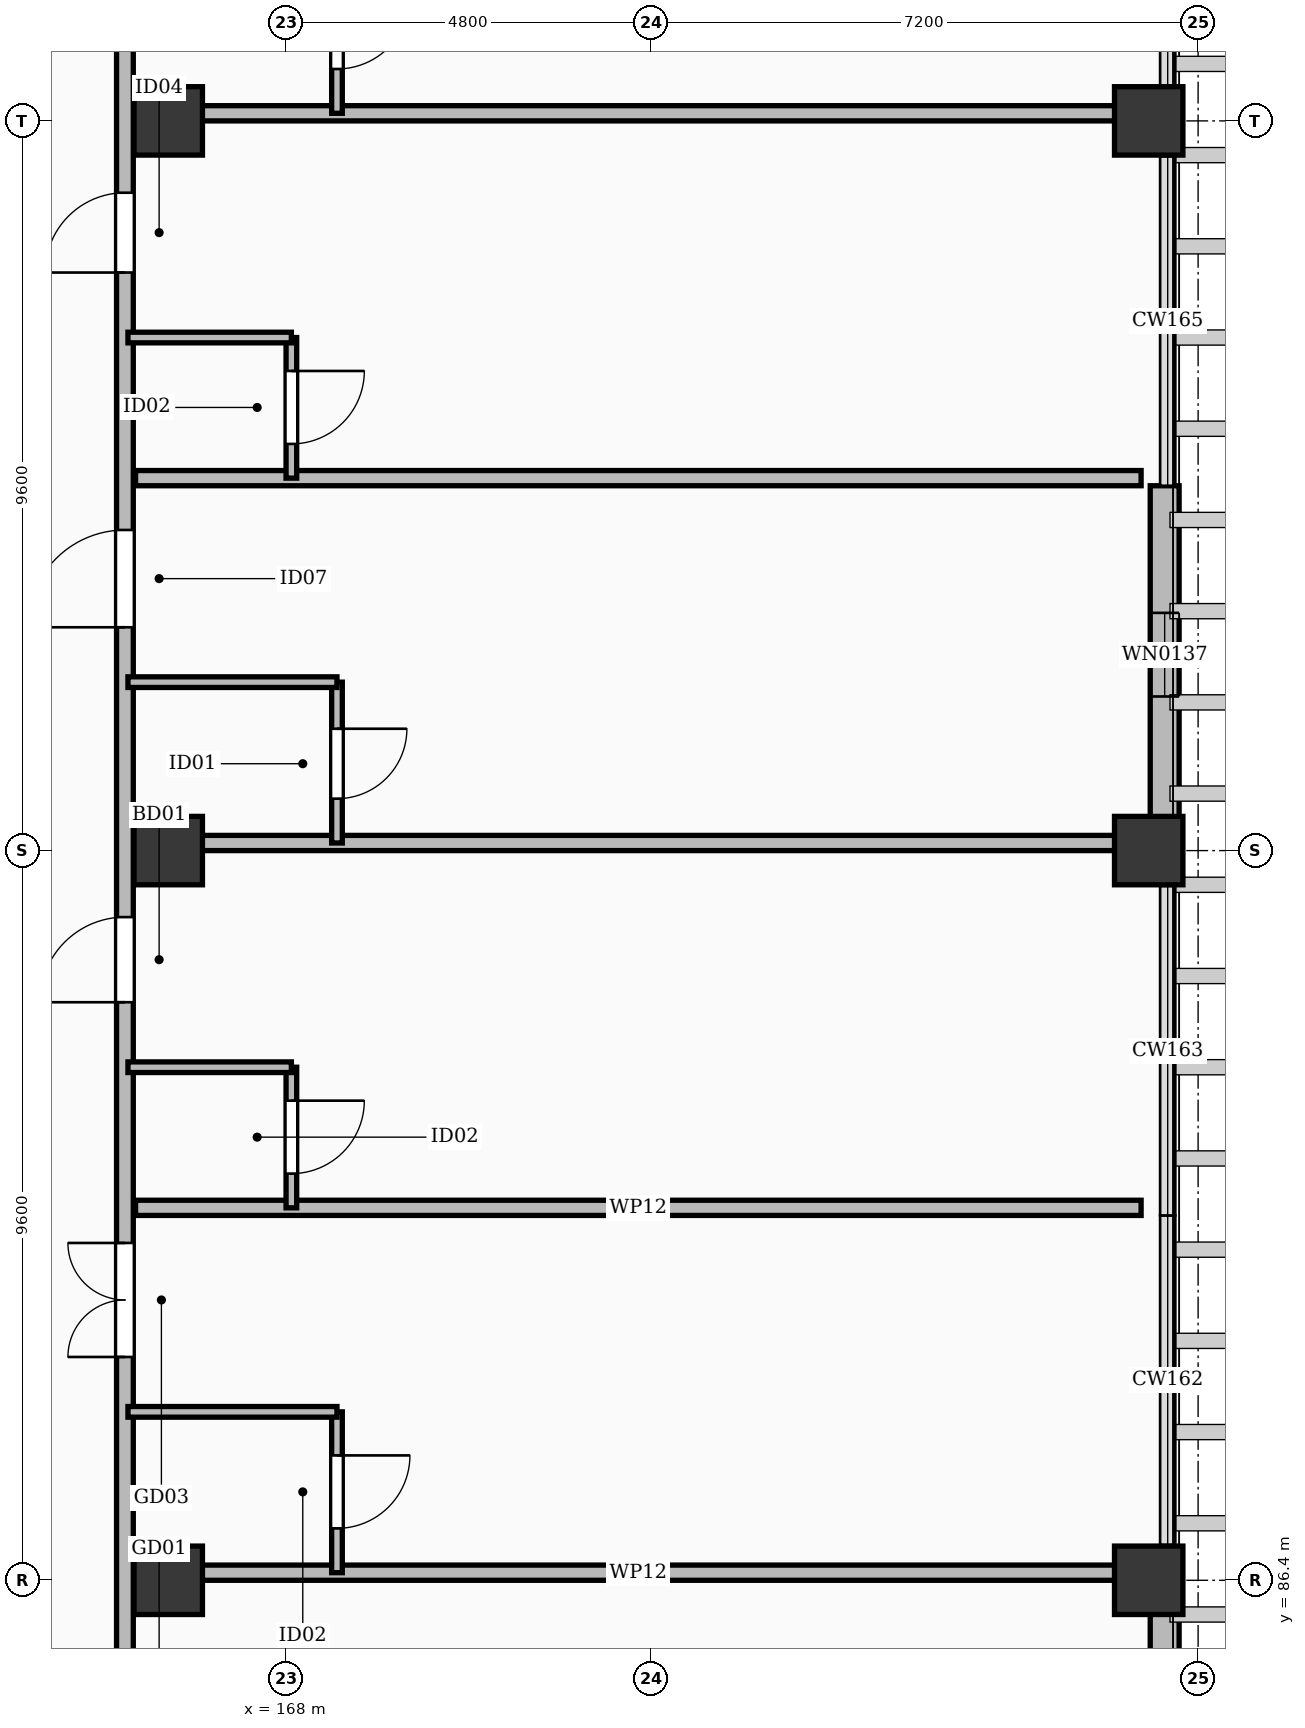
"""IFC4 building model, lengths in metres.
Left out: names, types, materials, properties, quantities, classifications, styles, units other than length and angle.
Written with IfcOpenShell. Run it as: python <this file> out.ifc"""

import sys

from ifc_helpers import new_model, si_unit, direction, frame, frame_2d, origin, origin_2d, place, context, subcontext, project, spatial, rectangle, extrude, element, fill, save


model = new_model("IFC4")
c1 = context("Model", 3, precision=1e-05, world=origin(), true_north=direction((0.0, 1.0)))
c2 = subcontext(c1, "Body", "Model", "MODEL_VIEW")
j1 = project(units=[si_unit("LENGTHUNIT", "METRE"), si_unit("PLANEANGLEUNIT", "RADIAN")], contexts=[c1])
p1 = place(None, origin())
s1 = spatial("IfcSite", under=j1, at=p1, CompositionType="ELEMENT")
p2 = place(p1, origin())
s2 = spatial("IfcBuilding", under=s1, at=p2, CompositionType="ELEMENT")
p3 = place(p2, frame((0.0, 0.0, 16.2)))
s3 = spatial("IfcBuildingStorey", under=s2, at=p3, CompositionType="ELEMENT", Elevation=16.2)
for number, where, z_axis, x_axis in (
    (1, (166.45, 86.4, 0.0), (0.0, 0.0, 1.0), (1.0, 0.0, 0.0)),
    (2, (166.45, 96.0, 0.0), (0.0, 0.0, 1.0), (1.0, 0.0, 0.0)),
    (3, (166.45, 105.6, 0.0), (0.0, 0.0, 1.0), (1.0, 0.0, 0.0)),
    (4, (179.35, 86.4, 0.0), (0.0, 0.0, 1.0), (1.0, 0.0, 0.0)),
    (5, (179.35, 96.0, 0.0), (0.0, 0.0, 1.0), (1.0, 0.0, 0.0)),
    (6, (179.35, 105.6, 0.0), (0.0, 0.0, 1.0), (1.0, 0.0, 0.0)),
):
    element("IfcColumn", number, at=place(p3, frame(where, z_axis=z_axis, x_axis=x_axis)), inside=s3, PredefinedType="COLUMN", context=c2, shape_type="SweptSolid", body=[
        extrude(rectangle(XDim=0.9, YDim=0.9, at=origin_2d()), origin(), (0.0, 0.0, 1.0), 4.8),
    ])
p4 = place(p3, frame((179.56, 85.975, 0.0), z_axis=(0.0, 0.0, 1.0), x_axis=(0.0, -1.0, 0.0)))
e7 = element("IfcWall", 7, at=p4, inside=s3, PredefinedType="SOLIDWALL", context=c2, shape_type="SweptSolid", body=[
    extrude(rectangle(XDim=4.375, YDim=0.38, at=frame_2d((2.188, 0.0))), origin(), (0.0, 0.0, 1.0), 3.032),
])
p5 = place(p4, frame((1.403, 0.0, 0.55)))
e8 = element("IfcOpeningElement", 8, at=p5, cuts=e7, PredefinedType="OPENING", context=c2, shape_type="SweptSolid", body=[
    extrude(rectangle(XDim=1.5, YDim=1.74, at=frame_2d((0.75, 0.87))), frame((0.0, 0.202, 0.0), z_axis=(0.0, -1.0, 0.0), x_axis=(1.0, 0.0, 0.0)), (0.0, 0.0, 1.0), 0.404),
])
p6 = place(p3, frame((179.56, 100.8, 0.0), z_axis=(0.0, 0.0, 1.0), x_axis=(0.0, -1.0, 0.0)))
e9 = element("IfcWall", 9, at=p6, inside=s3, PredefinedType="SOLIDWALL", context=c2, shape_type="SweptSolid", body=[
    extrude(rectangle(XDim=4.375, YDim=0.38, at=frame_2d((2.188, 0.0))), origin(), (0.0, 0.0, 1.0), 3.032),
])
p7 = place(p6, frame((1.673, 0.0, 0.55)))
e10 = element("IfcOpeningElement", 10, at=p7, cuts=e9, PredefinedType="OPENING", context=c2, shape_type="SweptSolid", body=[
    extrude(rectangle(XDim=1.1, YDim=1.7, at=frame_2d((0.55, 0.85))), frame((0.0, 0.202, 0.0), z_axis=(0.0, -1.0, 0.0), x_axis=(1.0, 0.0, 0.0)), (0.0, 0.0, 1.0), 0.404),
])
p8 = place(p3, frame((165.88, 65.4, 0.0), z_axis=(0.0, 0.0, 1.0), x_axis=(0.0, 1.0, 0.0)))
e11 = element("IfcWall", 11, at=p8, inside=s3, PredefinedType="PARTITIONING", context=c2, shape_type="SweptSolid", body=[
    extrude(rectangle(XDim=60.25, YDim=0.22, at=frame_2d((30.125, 0.0))), origin(), (0.0, 0.0, 1.0), 3.732),
])
p9 = place(p8, frame((4.738, 0.0, 0.0)))
e12 = element("IfcOpeningElement", 12, at=p9, cuts=e11, PredefinedType="OPENING", context=c2, shape_type="SweptSolid", body=[
    extrude(rectangle(XDim=1.28, YDim=2.16, at=frame_2d((0.64, 1.08))), frame((0.0, 0.122, 0.0), z_axis=(0.0, -1.0, 0.0), x_axis=(1.0, 0.0, 0.0)), (0.0, 0.0, 1.0), 0.244),
])
p10 = place(p8, frame((9.405, 0.0, 0.0)))
e13 = element("IfcOpeningElement", 13, at=p10, cuts=e11, PredefinedType="OPENING", context=c2, shape_type="SweptSolid", body=[
    extrude(rectangle(XDim=1.05, YDim=2.18, at=frame_2d((0.525, 1.09))), frame((0.0, 0.122, 0.0), z_axis=(0.0, -1.0, 0.0), x_axis=(1.0, 0.0, 0.0)), (0.0, 0.0, 1.0), 0.244),
])
p11 = place(p8, frame((14.338, 0.0, 0.0)))
e14 = element("IfcOpeningElement", 14, at=p11, cuts=e11, PredefinedType="OPENING", context=c2, shape_type="SweptSolid", body=[
    extrude(rectangle(XDim=1.08, YDim=2.25, at=frame_2d((0.54, 1.125))), frame((0.0, 0.122, 0.0), z_axis=(0.0, -1.0, 0.0), x_axis=(1.0, 0.0, 0.0)), (0.0, 0.0, 1.0), 0.244),
])
p12 = place(p8, frame((19.005, 0.0, 0.0)))
e15 = element("IfcOpeningElement", 15, at=p12, cuts=e11, PredefinedType="OPENING", context=c2, shape_type="SweptSolid", body=[
    extrude(rectangle(XDim=1.02, YDim=2.2, at=frame_2d((0.51, 1.1))), frame((0.0, 0.122, 0.0), z_axis=(0.0, -1.0, 0.0), x_axis=(1.0, 0.0, 0.0)), (0.0, 0.0, 1.0), 0.244),
])
p13 = place(p8, frame((23.938, 0.0, 0.0)))
e16 = element("IfcOpeningElement", 16, at=p13, cuts=e11, PredefinedType="OPENING", context=c2, shape_type="SweptSolid", body=[
    extrude(rectangle(XDim=1.5, YDim=2.3, at=frame_2d((0.75, 1.15))), frame((0.0, 0.122, 0.0), z_axis=(0.0, -1.0, 0.0), x_axis=(1.0, 0.0, 0.0)), (0.0, 0.0, 1.0), 0.244),
])
p14 = place(p8, frame((28.605, 0.0, 0.0)))
e17 = element("IfcOpeningElement", 17, at=p14, cuts=e11, PredefinedType="OPENING", context=c2, shape_type="SweptSolid", body=[
    extrude(rectangle(XDim=1.12, YDim=2.15, at=frame_2d((0.56, 1.075))), frame((0.0, 0.122, 0.0), z_axis=(0.0, -1.0, 0.0), x_axis=(1.0, 0.0, 0.0)), (0.0, 0.0, 1.0), 0.244),
])
p15 = place(p8, frame((33.538, 0.0, 0.0)))
e18 = element("IfcOpeningElement", 18, at=p15, cuts=e11, PredefinedType="OPENING", context=c2, shape_type="SweptSolid", body=[
    extrude(rectangle(XDim=1.28, YDim=2.16, at=frame_2d((0.64, 1.08))), frame((0.0, 0.122, 0.0), z_axis=(0.0, -1.0, 0.0), x_axis=(1.0, 0.0, 0.0)), (0.0, 0.0, 1.0), 0.244),
])
p16 = place(p8, frame((38.205, 0.0, 0.0)))
e19 = element("IfcOpeningElement", 19, at=p16, cuts=e11, PredefinedType="OPENING", context=c2, shape_type="SweptSolid", body=[
    extrude(rectangle(XDim=1.05, YDim=2.18, at=frame_2d((0.525, 1.09))), frame((0.0, 0.122, 0.0), z_axis=(0.0, -1.0, 0.0), x_axis=(1.0, 0.0, 0.0)), (0.0, 0.0, 1.0), 0.244),
])
p17 = place(p8, frame((43.138, 0.0, 0.0)))
e20 = element("IfcOpeningElement", 20, at=p17, cuts=e11, PredefinedType="OPENING", context=c2, shape_type="SweptSolid", body=[
    extrude(rectangle(XDim=1.08, YDim=2.25, at=frame_2d((0.54, 1.125))), frame((0.0, 0.122, 0.0), z_axis=(0.0, -1.0, 0.0), x_axis=(1.0, 0.0, 0.0)), (0.0, 0.0, 1.0), 0.244),
])
p18 = place(p8, frame((47.805, 0.0, 0.0)))
e21 = element("IfcOpeningElement", 21, at=p18, cuts=e11, PredefinedType="OPENING", context=c2, shape_type="SweptSolid", body=[
    extrude(rectangle(XDim=1.02, YDim=2.2, at=frame_2d((0.51, 1.1))), frame((0.0, 0.122, 0.0), z_axis=(0.0, -1.0, 0.0), x_axis=(1.0, 0.0, 0.0)), (0.0, 0.0, 1.0), 0.244),
])
p19 = place(p8, frame((52.738, 0.0, 0.0)))
e22 = element("IfcOpeningElement", 22, at=p19, cuts=e11, PredefinedType="OPENING", context=c2, shape_type="SweptSolid", body=[
    extrude(rectangle(XDim=1.5, YDim=2.3, at=frame_2d((0.75, 1.15))), frame((0.0, 0.122, 0.0), z_axis=(0.0, -1.0, 0.0), x_axis=(1.0, 0.0, 0.0)), (0.0, 0.0, 1.0), 0.244),
])
p20 = place(p8, frame((57.405, 0.0, 0.0)))
e23 = element("IfcOpeningElement", 23, at=p20, cuts=e11, PredefinedType="OPENING", context=c2, shape_type="SweptSolid", body=[
    extrude(rectangle(XDim=1.12, YDim=2.15, at=frame_2d((0.56, 1.075))), frame((0.0, 0.122, 0.0), z_axis=(0.0, -1.0, 0.0), x_axis=(1.0, 0.0, 0.0)), (0.0, 0.0, 1.0), 0.244),
])
p21 = place(p3, frame((166.02, 86.5, 0.0), z_axis=(0.0, 0.0, 1.0), x_axis=(1.0, 0.0, 0.0)))
e24 = element("IfcWall", 24, at=p21, inside=s3, PredefinedType="PARTITIONING", context=c2, shape_type="SweptSolid", body=[
    extrude(rectangle(XDim=13.23, YDim=0.2, at=frame_2d((6.615, 0.0))), origin(), (0.0, 0.0, 1.0), 3.032),
])
p22 = place(p3, frame((168.67, 86.5, 0.0), z_axis=(0.0, 0.0, 1.0), x_axis=(0.0, 1.0, 0.0)))
e25 = element("IfcWall", 25, at=p22, inside=s3, PredefinedType="PARTITIONING", context=c2, shape_type="SweptSolid", body=[
    extrude(rectangle(XDim=2.116, YDim=0.14, at=frame_2d((1.058, 0.0))), origin(), (0.0, 0.0, 1.0), 3.732),
])
p23 = place(p22, frame((0.583, 0.0, 0.0)))
e26 = element("IfcOpeningElement", 26, at=p23, cuts=e25, PredefinedType="OPENING", context=c2, shape_type="SweptSolid", body=[
    extrude(rectangle(XDim=0.96, YDim=2.12, at=frame_2d((0.48, 1.06))), frame((0.0, 0.082, 0.0), z_axis=(0.0, -1.0, 0.0), x_axis=(1.0, 0.0, 0.0)), (0.0, 0.0, 1.0), 0.164),
])
p24 = place(p3, frame((165.92, 88.616, 0.0), z_axis=(0.0, 0.0, 1.0), x_axis=(1.0, 0.0, 0.0)))
e27 = element("IfcWall", 27, at=p24, inside=s3, PredefinedType="PARTITIONING", context=c2, shape_type="SweptSolid", body=[
    extrude(rectangle(XDim=2.75, YDim=0.14, at=frame_2d((1.375, 0.0))), origin(), (0.0, 0.0, 1.0), 3.132),
])
p25 = place(p3, frame((166.02, 91.3, 0.0), z_axis=(0.0, 0.0, 1.0), x_axis=(1.0, 0.0, 0.0)))
e28 = element("IfcWall", 28, at=p25, inside=s3, PredefinedType="PARTITIONING", context=c2, shape_type="SweptSolid", body=[
    extrude(rectangle(XDim=13.23, YDim=0.2, at=frame_2d((6.615, 0.0))), origin(), (0.0, 0.0, 1.0), 3.032),
])
p26 = place(p3, frame((168.07, 91.3, 0.0), z_axis=(0.0, 0.0, 1.0), x_axis=(0.0, 1.0, 0.0)))
e29 = element("IfcWall", 29, at=p26, inside=s3, PredefinedType="PARTITIONING", context=c2, shape_type="SweptSolid", body=[
    extrude(rectangle(XDim=1.85, YDim=0.14, at=frame_2d((0.925, 0.0))), origin(), (0.0, 0.0, 1.0), 4.54),
])
p27 = place(p26, frame((0.45, 0.0, 0.0)))
e30 = element("IfcOpeningElement", 30, at=p27, cuts=e29, PredefinedType="OPENING", context=c2, shape_type="SweptSolid", body=[
    extrude(rectangle(XDim=0.96, YDim=2.12, at=frame_2d((0.48, 1.06))), frame((0.0, 0.082, 0.0), z_axis=(0.0, -1.0, 0.0), x_axis=(1.0, 0.0, 0.0)), (0.0, 0.0, 1.0), 0.164),
])
p28 = place(p3, frame((165.92, 93.15, 0.0), z_axis=(0.0, 0.0, 1.0), x_axis=(1.0, 0.0, 0.0)))
e31 = element("IfcWall", 31, at=p28, inside=s3, PredefinedType="PARTITIONING", context=c2, shape_type="SweptSolid", body=[
    extrude(rectangle(XDim=2.15, YDim=0.14, at=frame_2d((1.075, 0.0))), origin(), (0.0, 0.0, 1.0), 3.132),
])
p29 = place(p3, frame((166.02, 96.1, 0.0), z_axis=(0.0, 0.0, 1.0), x_axis=(1.0, 0.0, 0.0)))
e32 = element("IfcWall", 32, at=p29, inside=s3, PredefinedType="PARTITIONING", context=c2, shape_type="SweptSolid", body=[
    extrude(rectangle(XDim=13.23, YDim=0.2, at=frame_2d((6.615, 0.0))), origin(), (0.0, 0.0, 1.0), 3.032),
])
p30 = place(p3, frame((168.67, 96.1, 0.0), z_axis=(0.0, 0.0, 1.0), x_axis=(0.0, 1.0, 0.0)))
e33 = element("IfcWall", 33, at=p30, inside=s3, PredefinedType="PARTITIONING", context=c2, shape_type="SweptSolid", body=[
    extrude(rectangle(XDim=2.116, YDim=0.14, at=frame_2d((1.058, 0.0))), origin(), (0.0, 0.0, 1.0), 3.732),
])
p31 = place(p30, frame((0.583, 0.0, 0.0)))
e34 = element("IfcOpeningElement", 34, at=p31, cuts=e33, PredefinedType="OPENING", context=c2, shape_type="SweptSolid", body=[
    extrude(rectangle(XDim=0.92, YDim=2.1, at=frame_2d((0.46, 1.05))), frame((0.0, 0.082, 0.0), z_axis=(0.0, -1.0, 0.0), x_axis=(1.0, 0.0, 0.0)), (0.0, 0.0, 1.0), 0.164),
])
p32 = place(p3, frame((165.92, 98.216, 0.0), z_axis=(0.0, 0.0, 1.0), x_axis=(1.0, 0.0, 0.0)))
e35 = element("IfcWall", 35, at=p32, inside=s3, PredefinedType="PARTITIONING", context=c2, shape_type="SweptSolid", body=[
    extrude(rectangle(XDim=2.75, YDim=0.14, at=frame_2d((1.375, 0.0))), origin(), (0.0, 0.0, 1.0), 3.132),
])
p33 = place(p3, frame((166.02, 100.9, 0.0), z_axis=(0.0, 0.0, 1.0), x_axis=(1.0, 0.0, 0.0)))
e36 = element("IfcWall", 36, at=p33, inside=s3, PredefinedType="PARTITIONING", context=c2, shape_type="SweptSolid", body=[
    extrude(rectangle(XDim=13.23, YDim=0.2, at=frame_2d((6.615, 0.0))), origin(), (0.0, 0.0, 1.0), 3.032),
])
p34 = place(p3, frame((168.07, 100.9, 0.0), z_axis=(0.0, 0.0, 1.0), x_axis=(0.0, 1.0, 0.0)))
e37 = element("IfcWall", 37, at=p34, inside=s3, PredefinedType="PARTITIONING", context=c2, shape_type="SweptSolid", body=[
    extrude(rectangle(XDim=1.85, YDim=0.14, at=frame_2d((0.925, 0.0))), origin(), (0.0, 0.0, 1.0), 4.54),
])
p35 = place(p34, frame((0.45, 0.0, 0.0)))
e38 = element("IfcOpeningElement", 38, at=p35, cuts=e37, PredefinedType="OPENING", context=c2, shape_type="SweptSolid", body=[
    extrude(rectangle(XDim=0.96, YDim=2.12, at=frame_2d((0.48, 1.06))), frame((0.0, 0.082, 0.0), z_axis=(0.0, -1.0, 0.0), x_axis=(1.0, 0.0, 0.0)), (0.0, 0.0, 1.0), 0.164),
])
p36 = place(p3, frame((165.92, 102.75, 0.0), z_axis=(0.0, 0.0, 1.0), x_axis=(1.0, 0.0, 0.0)))
e39 = element("IfcWall", 39, at=p36, inside=s3, PredefinedType="PARTITIONING", context=c2, shape_type="SweptSolid", body=[
    extrude(rectangle(XDim=2.15, YDim=0.14, at=frame_2d((1.075, 0.0))), origin(), (0.0, 0.0, 1.0), 3.132),
])
p37 = place(p3, frame((166.02, 105.7, 0.0), z_axis=(0.0, 0.0, 1.0), x_axis=(1.0, 0.0, 0.0)))
e40 = element("IfcWall", 40, at=p37, inside=s3, PredefinedType="PARTITIONING", context=c2, shape_type="SweptSolid", body=[
    extrude(rectangle(XDim=13.23, YDim=0.2, at=frame_2d((6.615, 0.0))), origin(), (0.0, 0.0, 1.0), 3.032),
])
p38 = place(p3, frame((168.67, 105.7, 0.0), z_axis=(0.0, 0.0, 1.0), x_axis=(0.0, 1.0, 0.0)))
e41 = element("IfcWall", 41, at=p38, inside=s3, PredefinedType="PARTITIONING", context=c2, shape_type="SweptSolid", body=[
    extrude(rectangle(XDim=2.116, YDim=0.14, at=frame_2d((1.058, 0.0))), origin(), (0.0, 0.0, 1.0), 3.732),
])
p39 = place(p38, frame((0.583, 0.0, 0.0)))
e42 = element("IfcOpeningElement", 42, at=p39, cuts=e41, PredefinedType="OPENING", context=c2, shape_type="SweptSolid", body=[
    extrude(rectangle(XDim=0.96, YDim=2.12, at=frame_2d((0.48, 1.06))), frame((0.0, 0.082, 0.0), z_axis=(0.0, -1.0, 0.0), x_axis=(1.0, 0.0, 0.0)), (0.0, 0.0, 1.0), 0.164),
])
p40 = place(p7, origin())
e43 = element("IfcWindow", 43, at=p40, inside=s3, PartitioningType="SINGLE_PANEL", PredefinedType="WINDOW", context=c2, shape_type="SweptSolid", body=[
    extrude(rectangle(XDim=1.1, YDim=1.7, at=frame_2d((0.55, 0.85))), frame((0.0, 0.03, 0.0), z_axis=(0.0, -1.0, 0.0), x_axis=(1.0, 0.0, 0.0)), (0.0, 0.0, 1.0), 0.06),
])
fill(e10, e43)
p41 = place(p13, origin())
e44 = element("IfcDoor", 44, at=p41, inside=s3, OperationType="DOUBLE_DOOR_SINGLE_SWING", PredefinedType="DOOR", context=c2, shape_type="SweptSolid", body=[
    extrude(rectangle(XDim=1.5, YDim=2.3, at=frame_2d((0.75, 1.15))), frame((0.0, 0.025, 0.0), z_axis=(0.0, -1.0, 0.0), x_axis=(1.0, 0.0, 0.0)), (0.0, 0.0, 1.0), 0.05),
])
fill(e16, e44)
p42 = place(p23, frame((0.96, 0.0, 0.0), z_axis=(0.0, 0.0, 1.0), x_axis=(-1.0, 0.0, 0.0)))
e45 = element("IfcDoor", 45, at=p42, inside=s3, OperationType="SINGLE_SWING_RIGHT", PredefinedType="DOOR", context=c2, shape_type="SweptSolid", body=[
    extrude(rectangle(XDim=0.96, YDim=2.12, at=frame_2d((0.48, 1.06))), frame((0.0, 0.025, 0.0), z_axis=(0.0, -1.0, 0.0), x_axis=(1.0, 0.0, 0.0)), (0.0, 0.0, 1.0), 0.05),
])
fill(e26, e45)
p43 = place(p14, origin())
e46 = element("IfcDoor", 46, at=p43, inside=s3, OperationType="SINGLE_SWING_LEFT", PredefinedType="DOOR", context=c2, shape_type="SweptSolid", body=[
    extrude(rectangle(XDim=1.12, YDim=2.15, at=frame_2d((0.56, 1.075))), frame((0.0, 0.025, 0.0), z_axis=(0.0, -1.0, 0.0), x_axis=(1.0, 0.0, 0.0)), (0.0, 0.0, 1.0), 0.05),
])
fill(e17, e46)
p44 = place(p27, frame((0.96, 0.0, 0.0), z_axis=(0.0, 0.0, 1.0), x_axis=(-1.0, 0.0, 0.0)))
e47 = element("IfcDoor", 47, at=p44, inside=s3, OperationType="SINGLE_SWING_RIGHT", PredefinedType="DOOR", context=c2, shape_type="SweptSolid", body=[
    extrude(rectangle(XDim=0.96, YDim=2.12, at=frame_2d((0.48, 1.06))), frame((0.0, 0.025, 0.0), z_axis=(0.0, -1.0, 0.0), x_axis=(1.0, 0.0, 0.0)), (0.0, 0.0, 1.0), 0.05),
])
fill(e30, e47)
p45 = place(p15, origin())
e48 = element("IfcDoor", 48, at=p45, inside=s3, OperationType="SINGLE_SWING_LEFT", PredefinedType="DOOR", context=c2, shape_type="SweptSolid", body=[
    extrude(rectangle(XDim=1.28, YDim=2.16, at=frame_2d((0.64, 1.08))), frame((0.0, 0.025, 0.0), z_axis=(0.0, -1.0, 0.0), x_axis=(1.0, 0.0, 0.0)), (0.0, 0.0, 1.0), 0.05),
])
fill(e18, e48)
p46 = place(p31, frame((0.92, 0.0, 0.0), z_axis=(0.0, 0.0, 1.0), x_axis=(-1.0, 0.0, 0.0)))
e49 = element("IfcDoor", 49, at=p46, inside=s3, OperationType="SINGLE_SWING_RIGHT", PredefinedType="DOOR", context=c2, shape_type="SweptSolid", body=[
    extrude(rectangle(XDim=0.92, YDim=2.1, at=frame_2d((0.46, 1.05))), frame((0.0, 0.025, 0.0), z_axis=(0.0, -1.0, 0.0), x_axis=(1.0, 0.0, 0.0)), (0.0, 0.0, 1.0), 0.05),
])
fill(e34, e49)
p47 = place(p16, origin())
e50 = element("IfcDoor", 50, at=p47, inside=s3, OperationType="SINGLE_SWING_LEFT", PredefinedType="DOOR", context=c2, shape_type="SweptSolid", body=[
    extrude(rectangle(XDim=1.05, YDim=2.18, at=frame_2d((0.525, 1.09))), frame((0.0, 0.025, 0.0), z_axis=(0.0, -1.0, 0.0), x_axis=(1.0, 0.0, 0.0)), (0.0, 0.0, 1.0), 0.05),
])
fill(e19, e50)
p48 = place(p35, frame((0.96, 0.0, 0.0), z_axis=(0.0, 0.0, 1.0), x_axis=(-1.0, 0.0, 0.0)))
e51 = element("IfcDoor", 51, at=p48, inside=s3, OperationType="SINGLE_SWING_RIGHT", PredefinedType="DOOR", context=c2, shape_type="SweptSolid", body=[
    extrude(rectangle(XDim=0.96, YDim=2.12, at=frame_2d((0.48, 1.06))), frame((0.0, 0.025, 0.0), z_axis=(0.0, -1.0, 0.0), x_axis=(1.0, 0.0, 0.0)), (0.0, 0.0, 1.0), 0.05),
])
fill(e38, e51)
p49 = place(p39, frame((0.96, 0.0, 0.0), z_axis=(0.0, 0.0, 1.0), x_axis=(-1.0, 0.0, 0.0)))
e52 = element("IfcDoor", 52, at=p49, inside=s3, OperationType="SINGLE_SWING_RIGHT", PredefinedType="DOOR", context=c2, shape_type="SweptSolid", body=[
    extrude(rectangle(XDim=0.96, YDim=2.12, at=frame_2d((0.48, 1.06))), frame((0.0, 0.025, 0.0), z_axis=(0.0, -1.0, 0.0), x_axis=(1.0, 0.0, 0.0)), (0.0, 0.0, 1.0), 0.05),
])
fill(e42, e52)
save(model, sys.argv[1])
